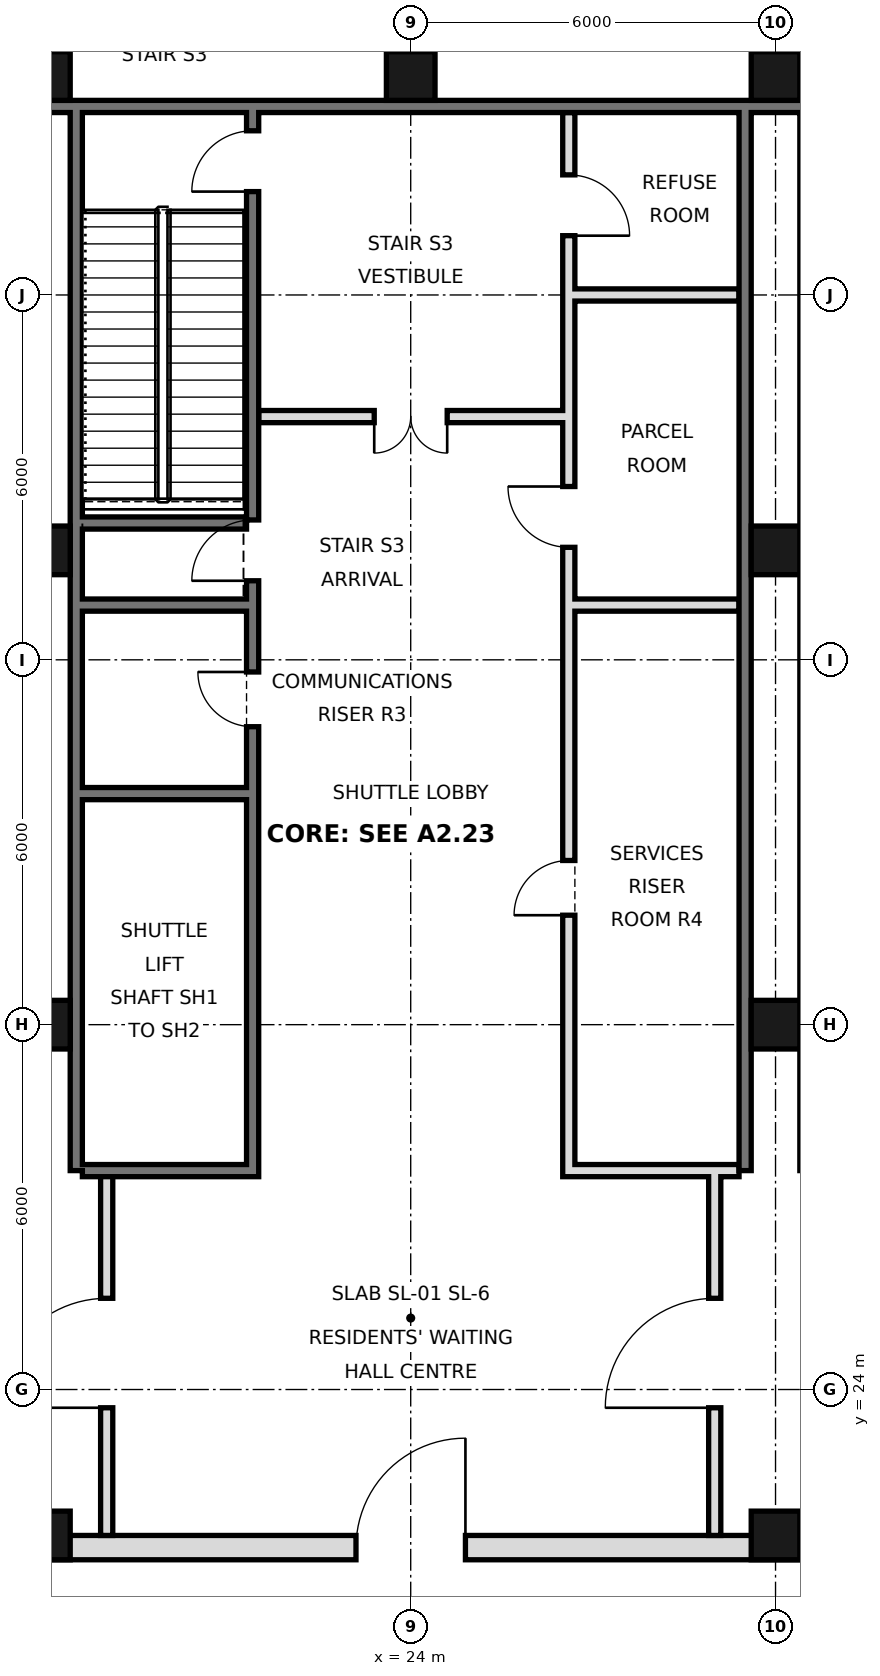
"""IFC4 building model, lengths in metres.
Left out: names, types, materials, properties, quantities, classifications, styles, units other than length and angle.
Written with IfcOpenShell. Run it as: python <this file> out.ifc"""

import sys

from ifc_helpers import new_model, si_unit, direction, frame, frame_2d, origin, origin_2d, place, context, subcontext, project, spatial, rectangle, hollow_rectangle, extrude, element, fill, save


model = new_model("IFC4")
c1 = context("Model", 3, precision=1e-05, world=origin(), true_north=direction((0.0, 1.0)))
c2 = subcontext(c1, "Body", "Model", "MODEL_VIEW")
j1 = project(units=[si_unit("LENGTHUNIT", "METRE"), si_unit("PLANEANGLEUNIT", "RADIAN")], contexts=[c1])
p1 = place(None, origin())
s1 = spatial("IfcSite", under=j1, at=p1, CompositionType="ELEMENT")
p2 = place(p1, origin())
s2 = spatial("IfcBuilding", under=s1, at=p2, CompositionType="ELEMENT")
p3 = place(p2, frame((0.0, 0.0, 90.2)))
s3 = spatial("IfcBuildingStorey", under=s2, at=p3, CompositionType="ELEMENT", Elevation=90.2)
for number, where, z_axis, x_axis in (
    (1, (18.0, 21.6, 0.0), (0.0, 0.0, 1.0), (1.0, 0.0, 0.0)),
    (2, (18.0, 30.0, 0.0), (0.0, 0.0, 1.0), (1.0, 0.0, 0.0)),
    (3, (18.0, 37.8, 0.0), (0.0, 0.0, 1.0), (1.0, 0.0, 0.0)),
    (4, (18.0, 45.6, 0.0), (0.0, 0.0, 1.0), (1.0, 0.0, 0.0)),
    (5, (24.0, 45.6, 0.0), (0.0, 0.0, 1.0), (1.0, 0.0, 0.0)),
    (6, (30.0, 21.6, 0.0), (0.0, 0.0, 1.0), (1.0, 0.0, 0.0)),
    (7, (30.0, 30.0, 0.0), (0.0, 0.0, 1.0), (1.0, 0.0, 0.0)),
    (8, (30.0, 37.8, 0.0), (0.0, 0.0, 1.0), (1.0, 0.0, 0.0)),
    (9, (30.0, 45.6, 0.0), (0.0, 0.0, 1.0), (1.0, 0.0, 0.0)),
):
    element("IfcColumn", number, at=place(p3, frame(where, z_axis=z_axis, x_axis=x_axis)), inside=s3, PredefinedType="COLUMN", context=c2, shape_type="SweptSolid", body=[
        extrude(hollow_rectangle(XDim=0.8, YDim=0.8, WallThickness=0.06, at=origin_2d()), origin(), (0.0, 0.0, 1.0), 6.0),
    ])
p4 = place(p3, frame((6.6, 45.1, 0.0), z_axis=(0.0, 0.0, 1.0), x_axis=(1.0, 0.0, 0.0)))
e10 = element("IfcWall", 10, at=p4, inside=s3, PredefinedType="SOLIDWALL", context=c2, shape_type="SweptSolid", body=[
    extrude(rectangle(XDim=34.8, YDim=0.2, at=frame_2d((17.4, 0.0))), origin(), (0.0, 0.0, 1.0), 5.7),
])
for number, where, z_axis, x_axis in (
    (11, (18.5, 27.6, 0.0), (0.0, 0.0, 1.0), (0.0, 1.0, 0.0)),
    (12, (29.5, 27.6, 0.0), (0.0, 0.0, 1.0), (0.0, 1.0, 0.0)),
):
    element("IfcWall", number, at=place(p3, frame(where, z_axis=z_axis, x_axis=x_axis)), inside=s3, PredefinedType="SOLIDWALL", context=c2, shape_type="SweptSolid", body=[
        extrude(rectangle(XDim=17.5, YDim=0.2, at=frame_2d((8.75, 0.0))), origin(), (0.0, 0.0, 1.0), 5.7),
    ])
p5 = place(p3, frame((5.6, 21.4, 0.0), z_axis=(0.0, 0.0, 1.0), x_axis=(1.0, 0.0, 0.0)))
e13 = element("IfcWall", 13, at=p5, inside=s3, PredefinedType="SOLIDWALL", context=c2, shape_type="SweptSolid", body=[
    extrude(rectangle(XDim=36.8, YDim=0.4, at=frame_2d((18.4, 0.0))), origin(), (0.0, 0.0, 1.0), 5.7),
])
p6 = place(p5, frame((8.5, 0.0, 0.0)))
e14 = element("IfcOpeningElement", 14, at=p6, cuts=e13, PredefinedType="OPENING", context=c2, shape_type="SweptSolid", body=[
    extrude(rectangle(XDim=1.8, YDim=2.1, at=frame_2d((0.9, 1.05))), frame((0.0, 0.21, 0.0), z_axis=(0.0, -1.0, 0.0), x_axis=(1.0, 0.0, 0.0)), (0.0, 0.0, 1.0), 0.42),
])
p7 = place(p5, frame((17.5, 0.0, 0.0)))
e15 = element("IfcOpeningElement", 15, at=p7, cuts=e13, PredefinedType="OPENING", context=c2, shape_type="SweptSolid", body=[
    extrude(rectangle(XDim=1.8, YDim=2.1, at=frame_2d((0.9, 1.05))), frame((0.0, 0.21, 0.0), z_axis=(0.0, -1.0, 0.0), x_axis=(1.0, 0.0, 0.0)), (0.0, 0.0, 1.0), 0.42),
])
p8 = place(p5, frame((26.5, 0.0, 0.0)))
e16 = element("IfcOpeningElement", 16, at=p8, cuts=e13, PredefinedType="OPENING", context=c2, shape_type="SweptSolid", body=[
    extrude(rectangle(XDim=1.8, YDim=2.1, at=frame_2d((0.9, 1.05))), frame((0.0, 0.21, 0.0), z_axis=(0.0, -1.0, 0.0), x_axis=(1.0, 0.0, 0.0)), (0.0, 0.0, 1.0), 0.42),
])
p9 = place(p5, frame((4.5, 0.0, 0.0)))
e17 = element("IfcOpeningElement", 17, at=p9, cuts=e13, PredefinedType="OPENING", context=c2, shape_type="SweptSolid", body=[
    extrude(rectangle(XDim=1.2, YDim=2.1, at=frame_2d((0.6, 1.05))), frame((0.0, 0.21, 0.0), z_axis=(0.0, -1.0, 0.0), x_axis=(1.0, 0.0, 0.0)), (0.0, 0.0, 1.0), 0.42),
])
p10 = place(p5, frame((31.1, 0.0, 0.0)))
e18 = element("IfcOpeningElement", 18, at=p10, cuts=e13, PredefinedType="OPENING", context=c2, shape_type="SweptSolid", body=[
    extrude(rectangle(XDim=1.2, YDim=2.1, at=frame_2d((0.6, 1.05))), frame((0.0, 0.21, 0.0), z_axis=(0.0, -1.0, 0.0), x_axis=(1.0, 0.0, 0.0)), (0.0, 0.0, 1.0), 0.42),
])
p11 = place(p5, frame((1.163, 0.0, 0.0)))
e19 = element("IfcOpeningElement", 19, at=p11, cuts=e13, PredefinedType="OPENING", context=c2, shape_type="SweptSolid", body=[
    extrude(rectangle(XDim=0.9, YDim=2.1, at=frame_2d((0.45, 1.05))), frame((0.0, 0.21, 0.0), z_axis=(0.0, -1.0, 0.0), x_axis=(1.0, 0.0, 0.0)), (0.0, 0.0, 1.0), 0.42),
])
p12 = place(p5, frame((34.738, 0.0, 0.0)))
e20 = element("IfcOpeningElement", 20, at=p12, cuts=e13, PredefinedType="OPENING", context=c2, shape_type="SweptSolid", body=[
    extrude(rectangle(XDim=0.9, YDim=2.1, at=frame_2d((0.45, 1.05))), frame((0.0, 0.21, 0.0), z_axis=(0.0, -1.0, 0.0), x_axis=(1.0, 0.0, 0.0)), (0.0, 0.0, 1.0), 0.42),
])
p13 = place(p3, frame((19.0, 21.6, 0.0), z_axis=(0.0, 0.0, 1.0), x_axis=(0.0, 1.0, 0.0)))
e21 = element("IfcWall", 21, at=p13, inside=s3, PredefinedType="PARTITIONING", context=c2, shape_type="SweptSolid", body=[
    extrude(rectangle(XDim=6.0, YDim=0.2, at=frame_2d((3.0, 0.0))), origin(), (0.0, 0.0, 1.0), 5.7),
])
p14 = place(p13, frame((2.1, 0.0, 0.0)))
e22 = element("IfcOpeningElement", 22, at=p14, cuts=e21, PredefinedType="OPENING", context=c2, shape_type="SweptSolid", body=[
    extrude(rectangle(XDim=1.8, YDim=2.1, at=frame_2d((0.9, 1.05))), frame((0.0, 0.11, 0.0), z_axis=(0.0, -1.0, 0.0), x_axis=(1.0, 0.0, 0.0)), (0.0, 0.0, 1.0), 0.22),
])
p15 = place(p3, frame((29.0, 21.6, 0.0), z_axis=(0.0, 0.0, 1.0), x_axis=(0.0, 1.0, 0.0)))
e23 = element("IfcWall", 23, at=p15, inside=s3, PredefinedType="PARTITIONING", context=c2, shape_type="SweptSolid", body=[
    extrude(rectangle(XDim=6.0, YDim=0.2, at=frame_2d((3.0, 0.0))), origin(), (0.0, 0.0, 1.0), 5.7),
])
p16 = place(p15, frame((2.1, 0.0, 0.0)))
e24 = element("IfcOpeningElement", 24, at=p16, cuts=e23, PredefinedType="OPENING", context=c2, shape_type="SweptSolid", body=[
    extrude(rectangle(XDim=1.8, YDim=2.1, at=frame_2d((0.9, 1.05))), frame((0.0, 0.11, 0.0), z_axis=(0.0, -1.0, 0.0), x_axis=(1.0, 0.0, 0.0)), (0.0, 0.0, 1.0), 0.22),
])
p17 = place(p3, frame((21.4, 27.5, 0.0), z_axis=(0.0, 0.0, 1.0), x_axis=(0.0, 1.0, 0.0)))
e25 = element("IfcWall", 25, at=p17, inside=s3, PredefinedType="SOLIDWALL", context=c2, shape_type="SweptSolid", body=[
    extrude(rectangle(XDim=17.5, YDim=0.2, at=frame_2d((8.75, 0.0))), origin(), (0.0, 0.0, 1.0), 5.7),
])
p18 = place(p17, frame((9.8, 0.0, 0.0)))
e26 = element("IfcOpeningElement", 26, at=p18, cuts=e25, PredefinedType="OPENING", context=c2, shape_type="SweptSolid", body=[
    extrude(rectangle(XDim=1.0, YDim=2.1, at=frame_2d((0.5, 1.05))), frame((0.0, 0.11, 0.0), z_axis=(0.0, -1.0, 0.0), x_axis=(1.0, 0.0, 0.0)), (0.0, 0.0, 1.0), 0.22),
])
p19 = place(p17, frame((16.2, 0.0, 0.0)))
e27 = element("IfcOpeningElement", 27, at=p19, cuts=e25, PredefinedType="OPENING", context=c2, shape_type="SweptSolid", body=[
    extrude(rectangle(XDim=1.0, YDim=2.1, at=frame_2d((0.5, 1.05))), frame((0.0, 0.11, 0.0), z_axis=(0.0, -1.0, 0.0), x_axis=(1.0, 0.0, 0.0)), (0.0, 0.0, 1.0), 0.22),
])
p20 = place(p17, frame((7.4, 0.0, 0.0)))
e28 = element("IfcOpeningElement", 28, at=p20, cuts=e25, PredefinedType="OPENING", context=c2, shape_type="SweptSolid", body=[
    extrude(rectangle(XDim=0.9, YDim=2.1, at=frame_2d((0.45, 1.05))), frame((0.0, 0.11, 0.0), z_axis=(0.0, -1.0, 0.0), x_axis=(1.0, 0.0, 0.0)), (0.0, 0.0, 1.0), 0.22),
])
p21 = place(p3, frame((26.6, 27.5, 0.0), z_axis=(0.0, 0.0, 1.0), x_axis=(0.0, 1.0, 0.0)))
e29 = element("IfcWall", 29, at=p21, inside=s3, PredefinedType="SOLIDWALL", context=c2, shape_type="SweptSolid", body=[
    extrude(rectangle(XDim=17.5, YDim=0.2, at=frame_2d((8.75, 0.0))), origin(), (0.0, 0.0, 1.0), 5.7),
])
p22 = place(p21, frame((4.3, 0.0, 0.0)))
e30 = element("IfcOpeningElement", 30, at=p22, cuts=e29, PredefinedType="OPENING", context=c2, shape_type="SweptSolid", body=[
    extrude(rectangle(XDim=0.9, YDim=2.1, at=frame_2d((0.45, 1.05))), frame((0.0, 0.11, 0.0), z_axis=(0.0, -1.0, 0.0), x_axis=(1.0, 0.0, 0.0)), (0.0, 0.0, 1.0), 0.22),
])
p23 = place(p21, frame((10.35, 0.0, 0.0)))
e31 = element("IfcOpeningElement", 31, at=p23, cuts=e29, PredefinedType="OPENING", context=c2, shape_type="SweptSolid", body=[
    extrude(rectangle(XDim=1.0, YDim=2.1, at=frame_2d((0.5, 1.05))), frame((0.0, 0.11, 0.0), z_axis=(0.0, -1.0, 0.0), x_axis=(1.0, 0.0, 0.0)), (0.0, 0.0, 1.0), 0.22),
])
p24 = place(p21, frame((15.475, 0.0, 0.0)))
e32 = element("IfcOpeningElement", 32, at=p24, cuts=e29, PredefinedType="OPENING", context=c2, shape_type="SweptSolid", body=[
    extrude(rectangle(XDim=1.0, YDim=2.1, at=frame_2d((0.5, 1.05))), frame((0.0, 0.11, 0.0), z_axis=(0.0, -1.0, 0.0), x_axis=(1.0, 0.0, 0.0)), (0.0, 0.0, 1.0), 0.22),
])
for number, where, z_axis, x_axis in (
    (33, (18.6, 27.6, 0.0), (0.0, 0.0, 1.0), (1.0, 0.0, 0.0)),
    (34, (26.7, 27.6, 0.0), (0.0, 0.0, 1.0), (1.0, 0.0, 0.0)),
    (35, (18.6, 33.8, 0.0), (0.0, 0.0, 1.0), (1.0, 0.0, 0.0)),
    (36, (18.6, 36.9, 0.0), (0.0, 0.0, 1.0), (1.0, 0.0, 0.0)),
    (37, (26.7, 36.9, 0.0), (0.0, 0.0, 1.0), (1.0, 0.0, 0.0)),
):
    element("IfcWall", number, at=place(p3, frame(where, z_axis=z_axis, x_axis=x_axis)), inside=s3, PredefinedType="SOLIDWALL", context=c2, shape_type="SweptSolid", body=[
        extrude(rectangle(XDim=2.7, YDim=0.2, at=frame_2d((1.35, 0.0))), origin(), (0.0, 0.0, 1.0), 5.7),
    ])
p25 = place(p3, frame((18.6, 38.25, 0.0), z_axis=(0.0, 0.0, 1.0), x_axis=(1.0, 0.0, 0.0)))
e38 = element("IfcWall", 38, at=p25, inside=s3, PredefinedType="SOLIDWALL", context=c2, shape_type="SweptSolid", body=[
    extrude(rectangle(XDim=2.7, YDim=0.2, at=frame_2d((1.35, 0.0))), origin(), (0.0, 0.0, 1.0), 2.8),
])
p26 = place(p3, frame((21.5, 40.0, 0.0), z_axis=(0.0, 0.0, 1.0), x_axis=(1.0, 0.0, 0.0)))
e39 = element("IfcWall", 39, at=p26, inside=s3, PredefinedType="PARTITIONING", context=c2, shape_type="SweptSolid", body=[
    extrude(rectangle(XDim=5.0, YDim=0.2, at=frame_2d((2.5, 0.0))), origin(), (0.0, 0.0, 1.0), 5.7),
])
p27 = place(p26, frame((1.9, 0.0, 0.0)))
e40 = element("IfcOpeningElement", 40, at=p27, cuts=e39, PredefinedType="OPENING", context=c2, shape_type="SweptSolid", body=[
    extrude(rectangle(XDim=1.2, YDim=2.1, at=frame_2d((0.6, 1.05))), frame((0.0, 0.11, 0.0), z_axis=(0.0, -1.0, 0.0), x_axis=(1.0, 0.0, 0.0)), (0.0, 0.0, 1.0), 0.22),
])
p28 = place(p3, frame((26.7, 42.0, 0.0), z_axis=(0.0, 0.0, 1.0), x_axis=(1.0, 0.0, 0.0)))
e41 = element("IfcWall", 41, at=p28, inside=s3, PredefinedType="PARTITIONING", context=c2, shape_type="SweptSolid", body=[
    extrude(rectangle(XDim=2.7, YDim=0.2, at=frame_2d((1.35, 0.0))), origin(), (0.0, 0.0, 1.0), 5.7),
])
p29 = place(p14, origin())
e42 = element("IfcDoor", 42, at=p29, inside=s3, OperationType="SINGLE_SWING_LEFT", PredefinedType="DOOR", context=c2, shape_type="SweptSolid", body=[
    extrude(rectangle(XDim=1.8, YDim=2.1, at=frame_2d((0.9, 1.05))), frame((0.0, 0.025, 0.0), z_axis=(0.0, -1.0, 0.0), x_axis=(1.0, 0.0, 0.0)), (0.0, 0.0, 1.0), 0.05),
])
fill(e22, e42)
p30 = place(p7, frame((1.8, 0.0, 0.0), z_axis=(0.0, 0.0, 1.0), x_axis=(-1.0, 0.0, 0.0)))
e43 = element("IfcDoor", 43, at=p30, inside=s3, OperationType="SINGLE_SWING_LEFT", PredefinedType="DOOR", context=c2, shape_type="SweptSolid", body=[
    extrude(rectangle(XDim=1.8, YDim=2.1, at=frame_2d((0.9, 1.05))), frame((0.0, 0.025, 0.0), z_axis=(0.0, -1.0, 0.0), x_axis=(1.0, 0.0, 0.0)), (0.0, 0.0, 1.0), 0.05),
])
fill(e15, e43)
p31 = place(p16, origin())
e44 = element("IfcDoor", 44, at=p31, inside=s3, OperationType="SINGLE_SWING_LEFT", PredefinedType="DOOR", context=c2, shape_type="SweptSolid", body=[
    extrude(rectangle(XDim=1.8, YDim=2.1, at=frame_2d((0.9, 1.05))), frame((0.0, 0.025, 0.0), z_axis=(0.0, -1.0, 0.0), x_axis=(1.0, 0.0, 0.0)), (0.0, 0.0, 1.0), 0.05),
])
fill(e24, e44)
p32 = place(p27, frame((1.2, 0.0, 0.0), z_axis=(0.0, 0.0, 1.0), x_axis=(-1.0, 0.0, 0.0)))
e45 = element("IfcDoor", 45, at=p32, inside=s3, OperationType="DOUBLE_DOOR_SINGLE_SWING", PredefinedType="DOOR", context=c2, shape_type="SweptSolid", body=[
    extrude(rectangle(XDim=1.2, YDim=2.1, at=frame_2d((0.6, 1.05))), frame((0.0, 0.025, 0.0), z_axis=(0.0, -1.0, 0.0), x_axis=(1.0, 0.0, 0.0)), (0.0, 0.0, 1.0), 0.05),
])
fill(e40, e45)
p33 = place(p18, origin())
e46 = element("IfcDoor", 46, at=p33, inside=s3, OperationType="SINGLE_SWING_LEFT", PredefinedType="DOOR", context=c2, shape_type="SweptSolid", body=[
    extrude(rectangle(XDim=1.0, YDim=2.1, at=frame_2d((0.5, 1.05))), frame((0.0, 0.025, 0.0), z_axis=(0.0, -1.0, 0.0), x_axis=(1.0, 0.0, 0.0)), (0.0, 0.0, 1.0), 0.05),
])
fill(e26, e46)
p34 = place(p19, origin())
e47 = element("IfcDoor", 47, at=p34, inside=s3, OperationType="SINGLE_SWING_LEFT", PredefinedType="DOOR", context=c2, shape_type="SweptSolid", body=[
    extrude(rectangle(XDim=1.0, YDim=2.1, at=frame_2d((0.5, 1.05))), frame((0.0, 0.025, 0.0), z_axis=(0.0, -1.0, 0.0), x_axis=(1.0, 0.0, 0.0)), (0.0, 0.0, 1.0), 0.05),
])
fill(e27, e47)
p35 = place(p20, frame((0.9, 0.0, 0.0), z_axis=(0.0, 0.0, 1.0), x_axis=(-1.0, 0.0, 0.0)))
e48 = element("IfcDoor", 48, at=p35, inside=s3, OperationType="SINGLE_SWING_LEFT", PredefinedType="DOOR", context=c2, shape_type="SweptSolid", body=[
    extrude(rectangle(XDim=0.9, YDim=2.1, at=frame_2d((0.45, 1.05))), frame((0.0, 0.025, 0.0), z_axis=(0.0, -1.0, 0.0), x_axis=(1.0, 0.0, 0.0)), (0.0, 0.0, 1.0), 0.05),
])
fill(e28, e48)
p36 = place(p22, origin())
e49 = element("IfcDoor", 49, at=p36, inside=s3, OperationType="SINGLE_SWING_LEFT", PredefinedType="DOOR", context=c2, shape_type="SweptSolid", body=[
    extrude(rectangle(XDim=0.9, YDim=2.1, at=frame_2d((0.45, 1.05))), frame((0.0, 0.025, 0.0), z_axis=(0.0, -1.0, 0.0), x_axis=(1.0, 0.0, 0.0)), (0.0, 0.0, 1.0), 0.05),
])
fill(e30, e49)
p37 = place(p23, frame((1.0, 0.0, 0.0), z_axis=(0.0, 0.0, 1.0), x_axis=(-1.0, 0.0, 0.0)))
e50 = element("IfcDoor", 50, at=p37, inside=s3, OperationType="SINGLE_SWING_LEFT", PredefinedType="DOOR", context=c2, shape_type="SweptSolid", body=[
    extrude(rectangle(XDim=1.0, YDim=2.1, at=frame_2d((0.5, 1.05))), frame((0.0, 0.025, 0.0), z_axis=(0.0, -1.0, 0.0), x_axis=(1.0, 0.0, 0.0)), (0.0, 0.0, 1.0), 0.05),
])
fill(e31, e50)
p38 = place(p24, frame((1.0, 0.0, 0.0), z_axis=(0.0, 0.0, 1.0), x_axis=(-1.0, 0.0, 0.0)))
e51 = element("IfcDoor", 51, at=p38, inside=s3, OperationType="SINGLE_SWING_RIGHT", PredefinedType="DOOR", context=c2, shape_type="SweptSolid", body=[
    extrude(rectangle(XDim=1.0, YDim=2.1, at=frame_2d((0.5, 1.05))), frame((0.0, 0.025, 0.0), z_axis=(0.0, -1.0, 0.0), x_axis=(1.0, 0.0, 0.0)), (0.0, 0.0, 1.0), 0.05),
])
fill(e32, e51)
save(model, sys.argv[1])
